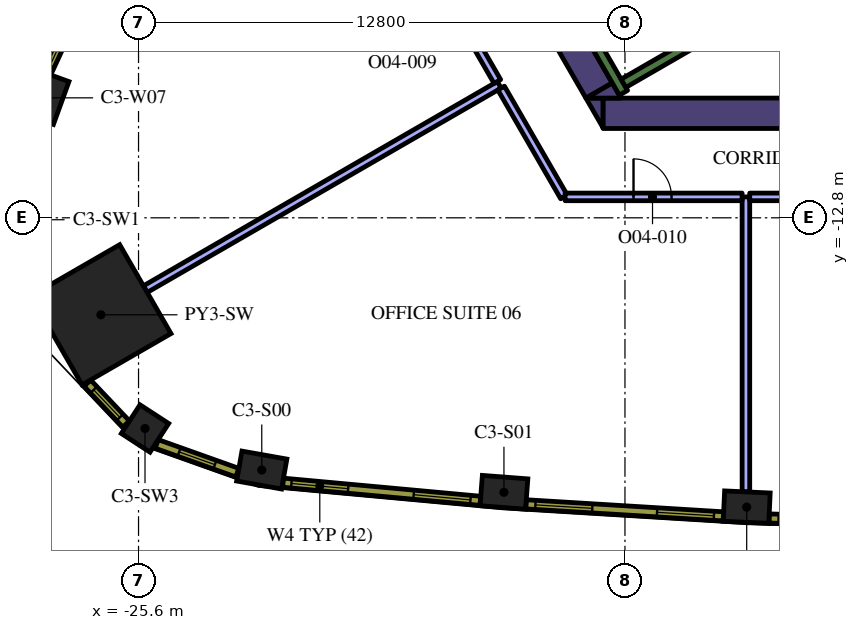
"""IFC4 building model, lengths in metres.
Left out: names, types, materials, properties, quantities, classifications, styles, units other than length and angle.
Written with IfcOpenShell. Run it as: python <this file> out.ifc"""

import sys

from ifc_helpers import new_model, si_unit, direction, frame, frame_2d, origin, origin_2d, place, context, subcontext, project, spatial, polyline, rectangle, outline, extrude, element, fill, save


model = new_model("IFC4")
c1 = context("Model", 3, precision=1e-05, world=origin(), true_north=direction((0.0, 1.0)))
c2 = subcontext(c1, "Body", "Model", "MODEL_VIEW")
j1 = project(units=[si_unit("LENGTHUNIT", "METRE"), si_unit("PLANEANGLEUNIT", "RADIAN")], contexts=[c1])
p1 = place(None, origin())
s1 = spatial("IfcSite", under=j1, at=p1, CompositionType="ELEMENT")
p2 = place(p1, origin())
s2 = spatial("IfcBuilding", under=s1, at=p2, CompositionType="ELEMENT")
p3 = place(p2, frame((0.0, 0.0, 183.6)))
s3 = spatial("IfcBuildingStorey", under=s2, at=p3, CompositionType="ELEMENT", Elevation=183.6)
p4 = place(p3, frame((-26.591, -15.352, 0.0), z_axis=(0.0, 0.0, 1.0), x_axis=(-0.866025403784, -0.5, 0.0)))
e1 = element("IfcColumn", 1, at=p4, inside=s3, PredefinedType="COLUMN", context=c2, shape_type="SweptSolid", body=[
    extrude(rectangle(XDim=2.7, YDim=2.7, at=origin_2d()), origin(), (0.0, 0.0, 1.0), 4.2),
])
for number, where, z_axis, x_axis in (
    (2, (-22.357, -19.437, 0.0), (0.0, 0.0, 1.0), (0.985, -0.175, 0.0)),
    (3, (-15.985, -20.022, 0.0), (0.0, 0.0, 1.0), (0.997, -0.076, 0.0)),
    (4, (-9.597, -20.413, 0.0), (0.0, 0.0, 1.0), (0.999, -0.046, 0.0)),
    (5, (-28.012, -9.644, 0.0), (0.0, 0.0, 1.0), (-0.341, -0.94, 0.0)),
):
    element("IfcColumn", number, at=place(p3, frame(where, z_axis=z_axis, x_axis=x_axis)), inside=s3, PredefinedType="COLUMN", context=c2, shape_type="SweptSolid", body=[
        extrude(rectangle(XDim=1.2, YDim=0.8, at=origin_2d()), origin(), (0.0, 0.0, 1.0), 4.2),
    ])
p5 = place(p3, frame((-25.43, -18.344, 0.0), z_axis=(0.0, 0.0, 1.0), x_axis=(0.838094050847, -0.545525766518, 0.0)))
e6 = element("IfcColumn", 6, at=p5, inside=s3, PredefinedType="COLUMN", context=c2, shape_type="SweptSolid", body=[
    extrude(rectangle(XDim=0.9, YDim=0.9, at=origin_2d()), origin(), (0.0, 0.0, 1.0), 4.2),
])
p6 = place(p3, frame((-13.378, -10.05, 0.0), z_axis=(0.0, 0.0, 1.0), x_axis=(1.0, 0.0, 0.0)))
e7 = element("IfcWall", 7, at=p6, inside=s3, PredefinedType="SOLIDWALL", context=c2, shape_type="SweptSolid", body=[
    extrude(rectangle(XDim=22.282, YDim=0.8, at=frame_2d((11.141, 0.0))), origin(), (0.0, 0.0, 1.0), 4.2),
])
p7 = place(p3, origin())
e8 = element("IfcWall", 8, at=p7, inside=s3, PredefinedType="SOLIDWALL", context=c2, shape_type="SweptSolid", body=[
    extrude(outline(polyline([(-13.828, -9.65), (-13.38, -9.65), (-13.38, -10.426), (-13.828, -9.65)])), origin(), (0.0, 0.0, 1.0), 4.2),
])
p8 = place(p3, frame((-15.392, -6.14, 0.0), z_axis=(0.0, 0.0, 1.0), x_axis=(0.499984020225, -0.866034629516, 0.0)))
e9 = element("IfcWall", 9, at=p8, inside=s3, PredefinedType="SOLIDWALL", context=c2, shape_type="SweptSolid", body=[
    extrude(rectangle(XDim=3.824, YDim=0.8, at=frame_2d((1.912, 0.0))), origin(), (0.0, 0.0, 1.0), 4.2),
])
e10 = element("IfcWall", 10, at=p7, inside=s3, PredefinedType="SOLIDWALL", context=c2, shape_type="SweptSolid", body=[
    extrude(outline(polyline([(-12.904, -9.65), (-13.82, -9.65), (-13.133, -9.253), (-12.904, -9.65)])), origin(), (0.0, 0.0, 1.0), 4.2),
])
p9 = place(p3, frame((-12.84, -9.511, 0.0), z_axis=(0.0, 0.0, 1.0), x_axis=(-0.499997733992, 0.866026712061, 0.0)))
e11 = element("IfcWall", 11, at=p9, inside=s3, PredefinedType="SOLIDWALL", context=c2, shape_type="SweptSolid", body=[
    extrude(rectangle(XDim=3.634, YDim=0.25, at=frame_2d((1.817, 0.0))), origin(), (0.0, 0.0, 1.0), 4.2),
])
p10 = place(p3, frame((-12.84, -9.261, 0.0), z_axis=(0.0, 0.0, 1.0), x_axis=(0.866016039709, 0.500016218704, 0.0)))
e12 = element("IfcWall", 12, at=p10, inside=s3, PredefinedType="SOLIDWALL", context=c2, shape_type="SweptSolid", body=[
    extrude(rectangle(XDim=7.05, YDim=0.25, at=frame_2d((3.525, 0.0))), origin(), (0.0, 0.0, 1.0), 4.2),
])
p11 = place(p3, frame((-9.617, -20.011, 0.0), z_axis=(0.0, 0.0, 1.0), x_axis=(0.0, 1.0, 0.0)))
e13 = element("IfcWall", 13, at=p11, inside=s3, PredefinedType="PARTITIONING", context=c2, shape_type="SweptSolid", body=[
    extrude(rectangle(XDim=7.761, YDim=0.2, at=frame_2d((3.881, 0.0))), origin(), (0.0, 0.0, 1.0), 3.15),
])
p12 = place(p3, frame((-9.517, -12.25, 0.0), z_axis=(0.0, 0.0, 1.0), x_axis=(1.0, 0.0, 0.0)))
e14 = element("IfcWall", 14, at=p12, inside=s3, PredefinedType="PARTITIONING", context=c2, shape_type="SweptSolid", body=[
    extrude(rectangle(XDim=5.987, YDim=0.2, at=frame_2d((2.994, 0.0))), origin(), (0.0, 0.0, 1.0), 3.15),
])
p13 = place(p3, frame((-16.108, -9.3, 0.0), z_axis=(0.0, 0.0, 1.0), x_axis=(-0.866027180319, -0.499996922939, 0.0)))
e15 = element("IfcWall", 15, at=p13, inside=s3, PredefinedType="PARTITIONING", context=c2, shape_type="SweptSolid", body=[
    extrude(rectangle(XDim=10.754, YDim=0.2, at=frame_2d((5.377, 0.0))), origin(), (0.0, 0.0, 1.0), 3.15),
])
p14 = place(p3, frame((-17.796, -6.376, 0.0), z_axis=(0.0, 0.0, 1.0), x_axis=(0.500001965626, -0.866024268927, 0.0)))
e16 = element("IfcWall", 16, at=p14, inside=s3, PredefinedType="PARTITIONING", context=c2, shape_type="SweptSolid", body=[
    extrude(rectangle(XDim=3.276, YDim=0.2, at=frame_2d((1.638, 0.0))), origin(), (0.0, 0.0, 1.0), 3.15),
])
p15 = place(p14, frame((1.1, 0.0, 0.0)))
e17 = element("IfcOpeningElement", 17, at=p15, cuts=e16, PredefinedType="OPENING", context=c2, shape_type="SweptSolid", body=[
    extrude(rectangle(XDim=1.0, YDim=2.1, at=frame_2d((0.5, 1.05))), frame((0.0, 0.11, 0.0), z_axis=(0.0, -1.0, 0.0), x_axis=(1.0, 0.0, 0.0)), (0.0, 0.0, 1.0), 0.22),
])
p16 = place(p3, frame((-16.058, -9.387, 0.0), z_axis=(0.0, 0.0, 1.0), x_axis=(0.500046299512, -0.865998671098, 0.0)))
e18 = element("IfcWall", 18, at=p16, inside=s3, PredefinedType="PARTITIONING", context=c2, shape_type="SweptSolid", body=[
    extrude(rectangle(XDim=3.306, YDim=0.2, at=frame_2d((1.653, 0.0))), origin(), (0.0, 0.0, 1.0), 3.15),
])
p17 = place(p3, frame((-14.375, -12.25, 0.0), z_axis=(0.0, 0.0, 1.0), x_axis=(1.0, 0.0, 0.0)))
e19 = element("IfcWall", 19, at=p17, inside=s3, PredefinedType="PARTITIONING", context=c2, shape_type="SweptSolid", body=[
    extrude(rectangle(XDim=4.658, YDim=0.2, at=frame_2d((2.329, 0.0))), origin(), (0.0, 0.0, 1.0), 3.15),
])
p18 = place(p17, frame((1.8, 0.0, 0.0)))
e20 = element("IfcOpeningElement", 20, at=p18, cuts=e19, PredefinedType="OPENING", context=c2, shape_type="SweptSolid", body=[
    extrude(rectangle(XDim=1.0, YDim=2.1, at=frame_2d((0.5, 1.05))), frame((0.0, 0.11, 0.0), z_axis=(0.0, -1.0, 0.0), x_axis=(1.0, 0.0, 0.0)), (0.0, 0.0, 1.0), 0.22),
])
p19 = place(p3, frame((-21.797, -19.77, 0.0), z_axis=(0.0, 0.0, 1.0), x_axis=(0.995808712151, -0.091460422067, 0.0)))
e21 = element("IfcWall", 21, at=p19, inside=s3, PredefinedType="SOLIDWALL", context=c2, shape_type="SweptSolid", body=[
    extrude(rectangle(XDim=5.213, YDim=0.24, at=frame_2d((2.606, 0.0))), origin(), (0.0, 0.0, 1.0), 3.95),
])
p20 = place(p19, frame((0.221, 0.0, 0.9)))
e22 = element("IfcOpeningElement", 22, at=p20, cuts=e21, PredefinedType="OPENING", context=c2, shape_type="SweptSolid", body=[
    extrude(rectangle(XDim=1.5, YDim=2.55, at=frame_2d((0.75, 1.275))), frame((0.0, 0.13, 0.0), z_axis=(0.0, -1.0, 0.0), x_axis=(1.0, 0.0, 0.0)), (0.0, 0.0, 1.0), 0.26),
])
p21 = place(p19, frame((3.452, 0.0, 0.9)))
e23 = element("IfcOpeningElement", 23, at=p21, cuts=e21, PredefinedType="OPENING", context=c2, shape_type="SweptSolid", body=[
    extrude(rectangle(XDim=1.5, YDim=2.55, at=frame_2d((0.75, 1.275))), frame((0.0, 0.13, 0.0), z_axis=(0.0, -1.0, 0.0), x_axis=(1.0, 0.0, 0.0)), (0.0, 0.0, 1.0), 0.26),
])
p22 = place(p3, frame((-15.405, -20.338, 0.0), z_axis=(0.0, 0.0, 1.0), x_axis=(0.998135294646, -0.061040425794, 0.0)))
e24 = element("IfcWall", 24, at=p22, inside=s3, PredefinedType="SOLIDWALL", context=c2, shape_type="SweptSolid", body=[
    extrude(rectangle(XDim=5.204, YDim=0.24, at=frame_2d((2.602, 0.0))), origin(), (0.0, 0.0, 1.0), 3.95),
])
p23 = place(p22, frame((0.248, 0.0, 0.9)))
e25 = element("IfcOpeningElement", 25, at=p23, cuts=e24, PredefinedType="OPENING", context=c2, shape_type="SweptSolid", body=[
    extrude(rectangle(XDim=1.5, YDim=2.55, at=frame_2d((0.75, 1.275))), frame((0.0, 0.13, 0.0), z_axis=(0.0, -1.0, 0.0), x_axis=(1.0, 0.0, 0.0)), (0.0, 0.0, 1.0), 0.26),
])
p24 = place(p22, frame((3.455, 0.0, 0.9)))
e26 = element("IfcOpeningElement", 26, at=p24, cuts=e24, PredefinedType="OPENING", context=c2, shape_type="SweptSolid", body=[
    extrude(rectangle(XDim=1.5, YDim=2.55, at=frame_2d((0.75, 1.275))), frame((0.0, 0.13, 0.0), z_axis=(0.0, -1.0, 0.0), x_axis=(1.0, 0.0, 0.0)), (0.0, 0.0, 1.0), 0.26),
])
p25 = place(p3, frame((-9.007, -20.711, 0.0), z_axis=(0.0, 0.0, 1.0), x_axis=(0.999533441983, -0.030543384845, 0.0)))
e27 = element("IfcWall", 27, at=p25, inside=s3, PredefinedType="SOLIDWALL", context=c2, shape_type="SweptSolid", body=[
    extrude(rectangle(XDim=5.204, YDim=0.24, at=frame_2d((2.602, 0.0))), origin(), (0.0, 0.0, 1.0), 3.95),
])
p26 = place(p25, frame((0.248, 0.0, 0.9)))
e28 = element("IfcOpeningElement", 28, at=p26, cuts=e27, PredefinedType="OPENING", context=c2, shape_type="SweptSolid", body=[
    extrude(rectangle(XDim=1.5, YDim=2.55, at=frame_2d((0.75, 1.275))), frame((0.0, 0.13, 0.0), z_axis=(0.0, -1.0, 0.0), x_axis=(1.0, 0.0, 0.0)), (0.0, 0.0, 1.0), 0.26),
])
p27 = place(p25, frame((3.455, 0.0, 0.9)))
e29 = element("IfcOpeningElement", 29, at=p27, cuts=e27, PredefinedType="OPENING", context=c2, shape_type="SweptSolid", body=[
    extrude(rectangle(XDim=1.5, YDim=2.55, at=frame_2d((0.75, 1.275))), frame((0.0, 0.13, 0.0), z_axis=(0.0, -1.0, 0.0), x_axis=(1.0, 0.0, 0.0)), (0.0, 0.0, 1.0), 0.26),
])
p28 = place(p3, frame((-25.837, -4.258, 0.0), z_axis=(0.0, 0.0, 1.0), x_axis=(-0.418722559465, -0.908114209885, 0.0)))
e30 = element("IfcWall", 30, at=p28, inside=s3, PredefinedType="SOLIDWALL", context=c2, shape_type="SweptSolid", body=[
    extrude(rectangle(XDim=5.213, YDim=0.24, at=frame_2d((2.606, 0.0))), origin(), (0.0, 0.0, 1.0), 3.95),
])
p29 = place(p28, frame((0.261, 0.0, 0.9)))
e31 = element("IfcOpeningElement", 31, at=p29, cuts=e30, PredefinedType="OPENING", context=c2, shape_type="SweptSolid", body=[
    extrude(rectangle(XDim=1.5, YDim=2.55, at=frame_2d((0.75, 1.275))), frame((0.0, 0.13, 0.0), z_axis=(0.0, -1.0, 0.0), x_axis=(1.0, 0.0, 0.0)), (0.0, 0.0, 1.0), 0.26),
])
p30 = place(p28, frame((3.492, 0.0, 0.9)))
e32 = element("IfcOpeningElement", 32, at=p30, cuts=e30, PredefinedType="OPENING", context=c2, shape_type="SweptSolid", body=[
    extrude(rectangle(XDim=1.5, YDim=2.55, at=frame_2d((0.75, 1.275))), frame((0.0, 0.13, 0.0), z_axis=(0.0, -1.0, 0.0), x_axis=(1.0, 0.0, 0.0)), (0.0, 0.0, 1.0), 0.26),
])
p31 = place(p3, frame((-26.946, -17.151, 0.0), z_axis=(0.0, 0.0, 1.0), x_axis=(0.687986858937, -0.725723144133, 0.0)))
e33 = element("IfcWall", 33, at=p31, inside=s3, PredefinedType="SOLIDWALL", context=c2, shape_type="SweptSolid", body=[
    extrude(rectangle(XDim=1.481, YDim=0.24, at=frame_2d((0.741, 0.0))), origin(), (0.0, 0.0, 1.0), 3.95),
])
p32 = place(p31, frame((0.241, 0.0, 0.9)))
e34 = element("IfcOpeningElement", 34, at=p32, cuts=e33, PredefinedType="OPENING", context=c2, shape_type="SweptSolid", body=[
    extrude(rectangle(XDim=1.0, YDim=2.55, at=frame_2d((0.5, 1.275))), frame((0.0, 0.13, 0.0), z_axis=(0.0, -1.0, 0.0), x_axis=(1.0, 0.0, 0.0)), (0.0, 0.0, 1.0), 0.26),
])
p33 = place(p3, frame((-25.121, -18.751, 0.0), z_axis=(0.0, 0.0, 1.0), x_axis=(0.942099727267, -0.335332825539, 0.0)))
e35 = element("IfcWall", 35, at=p33, inside=s3, PredefinedType="SOLIDWALL", context=c2, shape_type="SweptSolid", body=[
    extrude(rectangle(XDim=2.25, YDim=0.24, at=frame_2d((1.125, 0.0))), origin(), (0.0, 0.0, 1.0), 3.95),
])
p34 = place(p33, frame((0.625, 0.0, 0.9)))
e36 = element("IfcOpeningElement", 36, at=p34, cuts=e35, PredefinedType="OPENING", context=c2, shape_type="SweptSolid", body=[
    extrude(rectangle(XDim=1.0, YDim=2.55, at=frame_2d((0.5, 1.275))), frame((0.0, 0.13, 0.0), z_axis=(0.0, -1.0, 0.0), x_axis=(1.0, 0.0, 0.0)), (0.0, 0.0, 1.0), 0.26),
])
p35 = place(p18, origin())
e37 = element("IfcDoor", 37, at=p35, inside=s3, OperationType="SINGLE_SWING_LEFT", PredefinedType="DOOR", context=c2, shape_type="SweptSolid", body=[
    extrude(rectangle(XDim=1.0, YDim=2.1, at=frame_2d((0.5, 1.05))), frame((0.0, 0.025, 0.0), z_axis=(0.0, -1.0, 0.0), x_axis=(1.0, 0.0, 0.0)), (0.0, 0.0, 1.0), 0.05),
])
fill(e20, e37)
p36 = place(p20, origin())
e38 = element("IfcWindow", 38, at=p36, inside=s3, PartitioningType="SINGLE_PANEL", PredefinedType="WINDOW", context=c2, shape_type="SweptSolid", body=[
    extrude(rectangle(XDim=1.5, YDim=2.55, at=frame_2d((0.75, 1.275))), frame((0.0, 0.04, 0.0), z_axis=(0.0, -1.0, 0.0), x_axis=(1.0, 0.0, 0.0)), (0.0, 0.0, 1.0), 0.06),
])
fill(e22, e38)
p37 = place(p21, origin())
e39 = element("IfcWindow", 39, at=p37, inside=s3, PartitioningType="SINGLE_PANEL", PredefinedType="WINDOW", context=c2, shape_type="SweptSolid", body=[
    extrude(rectangle(XDim=1.5, YDim=2.55, at=frame_2d((0.75, 1.275))), frame((0.0, 0.04, 0.0), z_axis=(0.0, -1.0, 0.0), x_axis=(1.0, 0.0, 0.0)), (0.0, 0.0, 1.0), 0.06),
])
fill(e23, e39)
p38 = place(p23, origin())
e40 = element("IfcWindow", 40, at=p38, inside=s3, PartitioningType="SINGLE_PANEL", PredefinedType="WINDOW", context=c2, shape_type="SweptSolid", body=[
    extrude(rectangle(XDim=1.5, YDim=2.55, at=frame_2d((0.75, 1.275))), frame((0.0, 0.04, 0.0), z_axis=(0.0, -1.0, 0.0), x_axis=(1.0, 0.0, 0.0)), (0.0, 0.0, 1.0), 0.06),
])
fill(e25, e40)
p39 = place(p24, origin())
e41 = element("IfcWindow", 41, at=p39, inside=s3, PartitioningType="SINGLE_PANEL", PredefinedType="WINDOW", context=c2, shape_type="SweptSolid", body=[
    extrude(rectangle(XDim=1.5, YDim=2.55, at=frame_2d((0.75, 1.275))), frame((0.0, 0.04, 0.0), z_axis=(0.0, -1.0, 0.0), x_axis=(1.0, 0.0, 0.0)), (0.0, 0.0, 1.0), 0.06),
])
fill(e26, e41)
p40 = place(p26, origin())
e42 = element("IfcWindow", 42, at=p40, inside=s3, PartitioningType="SINGLE_PANEL", PredefinedType="WINDOW", context=c2, shape_type="SweptSolid", body=[
    extrude(rectangle(XDim=1.5, YDim=2.55, at=frame_2d((0.75, 1.275))), frame((0.0, 0.04, 0.0), z_axis=(0.0, -1.0, 0.0), x_axis=(1.0, 0.0, 0.0)), (0.0, 0.0, 1.0), 0.06),
])
fill(e28, e42)
p41 = place(p30, origin())
e43 = element("IfcWindow", 43, at=p41, inside=s3, PartitioningType="SINGLE_PANEL", PredefinedType="WINDOW", context=c2, shape_type="SweptSolid", body=[
    extrude(rectangle(XDim=1.5, YDim=2.55, at=frame_2d((0.75, 1.275))), frame((0.0, 0.04, 0.0), z_axis=(0.0, -1.0, 0.0), x_axis=(1.0, 0.0, 0.0)), (0.0, 0.0, 1.0), 0.06),
])
fill(e32, e43)
p42 = place(p32, origin())
e44 = element("IfcWindow", 44, at=p42, inside=s3, PartitioningType="SINGLE_PANEL", PredefinedType="WINDOW", context=c2, shape_type="SweptSolid", body=[
    extrude(rectangle(XDim=1.0, YDim=2.55, at=frame_2d((0.5, 1.275))), frame((0.0, 0.04, 0.0), z_axis=(0.0, -1.0, 0.0), x_axis=(1.0, 0.0, 0.0)), (0.0, 0.0, 1.0), 0.06),
])
fill(e34, e44)
p43 = place(p34, origin())
e45 = element("IfcWindow", 45, at=p43, inside=s3, PartitioningType="SINGLE_PANEL", PredefinedType="WINDOW", context=c2, shape_type="SweptSolid", body=[
    extrude(rectangle(XDim=1.0, YDim=2.55, at=frame_2d((0.5, 1.275))), frame((0.0, 0.04, 0.0), z_axis=(0.0, -1.0, 0.0), x_axis=(1.0, 0.0, 0.0)), (0.0, 0.0, 1.0), 0.06),
])
fill(e36, e45)
save(model, sys.argv[1])
